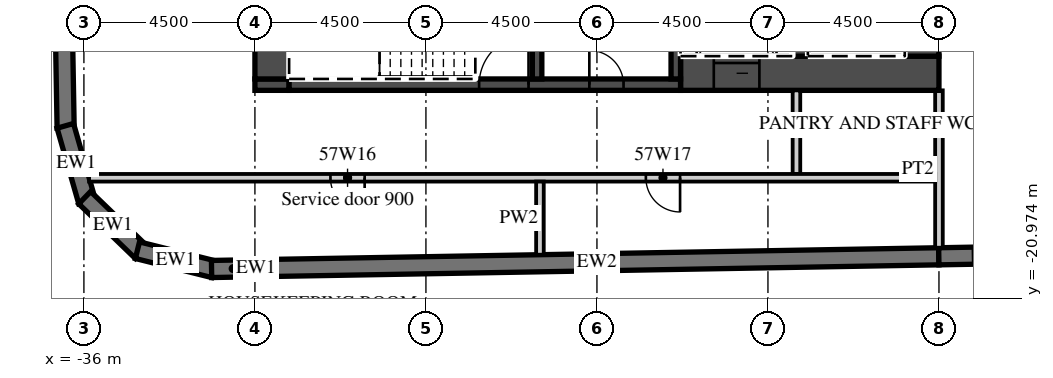
"""IFC4 building model, lengths in metres.
Left out: names, types, materials, properties, quantities, classifications, styles, units other than length and angle.
Written with IfcOpenShell. Run it as: python <this file> out.ifc"""

import sys

from ifc_helpers import new_model, si_unit, direction, frame, frame_2d, origin, place, context, subcontext, project, spatial, polyline, rectangle, outline, extrude, element, fill, save


model = new_model("IFC4")
c1 = context("Model", 3, precision=1e-05, world=origin(), true_north=direction((0.0, 1.0)))
c2 = subcontext(c1, "Body", "Model", "MODEL_VIEW")
j1 = project(units=[si_unit("LENGTHUNIT", "METRE"), si_unit("PLANEANGLEUNIT", "RADIAN")], contexts=[c1])
p1 = place(None, origin())
s1 = spatial("IfcSite", under=j1, at=p1, CompositionType="ELEMENT")
p2 = place(p1, origin())
s2 = spatial("IfcBuilding", under=s1, at=p2, CompositionType="ELEMENT")
p3 = place(p2, frame((0.0, 0.0, 234.2)))
s3 = spatial("IfcBuildingStorey", under=s2, at=p3, CompositionType="ELEMENT", Elevation=234.2)
p4 = place(p3, frame((-37.057, 16.503, 0.0), z_axis=(0.0, 0.0, 1.0), x_axis=(0.017452279857, -0.999847697366, 0.0)))
e1 = element("IfcWall", 1, at=p4, inside=s3, PredefinedType="SOLIDWALL", context=c2, shape_type="SweptSolid", body=[
    extrude(rectangle(XDim=33.0, YDim=0.45, at=frame_2d((16.5, 0.0))), origin(), (0.0, 0.0, 1.0), 3.02),
])
p5 = place(p3, frame((-36.49, -16.434, 0.0), z_axis=(0.0, 0.0, 1.0), x_axis=(0.275577603096, -0.961278827745, 0.0)))
e2 = element("IfcWall", 2, at=p5, inside=s3, PredefinedType="SOLIDWALL", context=c2, shape_type="SweptSolid", body=[
    extrude(outline(polyline([(0.0, -0.225), (2.071, -0.225), (1.95, 0.225), (0.121, 0.225), (0.0, -0.225)])), origin(), (0.0, 0.0, 1.0), 3.02),
])
p6 = place(p3, frame((-35.979, -18.324, 0.0), z_axis=(0.0, 0.0, 1.0), x_axis=(0.719320193998, -0.694678672846, 0.0)))
e3 = element("IfcWall", 3, at=p6, inside=s3, PredefinedType="SOLIDWALL", context=c2, shape_type="SweptSolid", body=[
    extrude(outline(polyline([(0.0, -0.225), (2.071, -0.225), (1.95, 0.225), (0.121, 0.225), (0.0, -0.225)])), origin(), (0.0, 0.0, 1.0), 3.02),
])
p7 = place(p3, frame((-34.591, -19.706, 0.0), z_axis=(0.0, 0.0, 1.0), x_axis=(0.970315655375, -0.241841950319, 0.0)))
e4 = element("IfcWall", 4, at=p7, inside=s3, PredefinedType="SOLIDWALL", context=c2, shape_type="SweptSolid", body=[
    extrude(outline(polyline([(0.0, -0.225), (2.071, -0.225), (1.95, 0.225), (0.121, 0.225), (0.0, -0.225)])), origin(), (0.0, 0.0, 1.0), 3.02),
])
p8 = place(p3, frame((-32.641, -20.2, 0.0), z_axis=(0.0, 0.0, 1.0), x_axis=(0.99984870815, 0.017394275206, 0.0)))
e5 = element("IfcWall", 5, at=p8, inside=s3, PredefinedType="SOLIDWALL", context=c2, shape_type="SweptSolid", body=[
    extrude(rectangle(XDim=1.137, YDim=0.45, at=frame_2d((0.568, 0.0))), origin(), (0.0, 0.0, 1.0), 3.02),
])
p9 = place(p3, frame((-31.504, -20.18, 0.0), z_axis=(0.0, 0.0, 1.0), x_axis=(0.999847677887, 0.017453395744, 0.0)))
e6 = element("IfcWall", 6, at=p9, inside=s3, PredefinedType="SOLIDWALL", context=c2, shape_type="SweptSolid", body=[
    extrude(rectangle(XDim=18.003, YDim=0.45, at=frame_2d((9.001, 0.0))), origin(), (0.0, 0.0, 1.0), 3.02),
])
p10 = place(p3, frame((-13.504, -19.866, 0.0), z_axis=(0.0, 0.0, 1.0), x_axis=(0.999847672978, 0.017453676992, 0.0)))
e7 = element("IfcWall", 7, at=p10, inside=s3, PredefinedType="SOLIDWALL", context=c2, shape_type="SweptSolid", body=[
    extrude(rectangle(XDim=52.86, YDim=0.45, at=frame_2d((26.43, 0.0))), origin(), (0.0, 0.0, 1.0), 3.02),
])
p11 = place(p10, frame((0.9, 0.0, 0.45)))
e8 = element("IfcOpeningElement", 8, at=p11, cuts=e7, PredefinedType="OPENING", context=c2, shape_type="SweptSolid", body=[
    extrude(rectangle(XDim=2.7, YDim=2.25, at=frame_2d((1.35, 1.125))), frame((0.0, 0.235, 0.0), z_axis=(0.0, -1.0, 0.0), x_axis=(1.0, 0.0, 0.0)), (0.0, 0.0, 1.0), 0.47),
])
p12 = place(p10, frame((5.401, 0.0, 0.45)))
e9 = element("IfcOpeningElement", 9, at=p12, cuts=e7, PredefinedType="OPENING", context=c2, shape_type="SweptSolid", body=[
    extrude(rectangle(XDim=2.7, YDim=2.25, at=frame_2d((1.35, 1.125))), frame((0.0, 0.235, 0.0), z_axis=(0.0, -1.0, 0.0), x_axis=(1.0, 0.0, 0.0)), (0.0, 0.0, 1.0), 0.47),
])
p13 = place(p10, frame((9.902, 0.0, 0.45)))
e10 = element("IfcOpeningElement", 10, at=p13, cuts=e7, PredefinedType="OPENING", context=c2, shape_type="SweptSolid", body=[
    extrude(rectangle(XDim=2.7, YDim=2.25, at=frame_2d((1.35, 1.125))), frame((0.0, 0.235, 0.0), z_axis=(0.0, -1.0, 0.0), x_axis=(1.0, 0.0, 0.0)), (0.0, 0.0, 1.0), 0.47),
])
p14 = place(p10, frame((14.402, 0.0, 0.45)))
e11 = element("IfcOpeningElement", 11, at=p14, cuts=e7, PredefinedType="OPENING", context=c2, shape_type="SweptSolid", body=[
    extrude(rectangle(XDim=2.7, YDim=2.25, at=frame_2d((1.35, 1.125))), frame((0.0, 0.235, 0.0), z_axis=(0.0, -1.0, 0.0), x_axis=(1.0, 0.0, 0.0)), (0.0, 0.0, 1.0), 0.47),
])
p15 = place(p10, frame((18.903, 0.0, 0.45)))
e12 = element("IfcOpeningElement", 12, at=p15, cuts=e7, PredefinedType="OPENING", context=c2, shape_type="SweptSolid", body=[
    extrude(rectangle(XDim=2.7, YDim=2.25, at=frame_2d((1.35, 1.125))), frame((0.0, 0.235, 0.0), z_axis=(0.0, -1.0, 0.0), x_axis=(1.0, 0.0, 0.0)), (0.0, 0.0, 1.0), 0.47),
])
p16 = place(p10, frame((23.404, 0.0, 0.45)))
e13 = element("IfcOpeningElement", 13, at=p16, cuts=e7, PredefinedType="OPENING", context=c2, shape_type="SweptSolid", body=[
    extrude(rectangle(XDim=2.7, YDim=2.25, at=frame_2d((1.35, 1.125))), frame((0.0, 0.235, 0.0), z_axis=(0.0, -1.0, 0.0), x_axis=(1.0, 0.0, 0.0)), (0.0, 0.0, 1.0), 0.47),
])
p17 = place(p10, frame((27.904, 0.0, 0.45)))
e14 = element("IfcOpeningElement", 14, at=p17, cuts=e7, PredefinedType="OPENING", context=c2, shape_type="SweptSolid", body=[
    extrude(rectangle(XDim=2.7, YDim=2.25, at=frame_2d((1.35, 1.125))), frame((0.0, 0.235, 0.0), z_axis=(0.0, -1.0, 0.0), x_axis=(1.0, 0.0, 0.0)), (0.0, 0.0, 1.0), 0.47),
])
p18 = place(p10, frame((32.405, 0.0, 0.45)))
e15 = element("IfcOpeningElement", 15, at=p18, cuts=e7, PredefinedType="OPENING", context=c2, shape_type="SweptSolid", body=[
    extrude(rectangle(XDim=2.7, YDim=2.25, at=frame_2d((1.35, 1.125))), frame((0.0, 0.235, 0.0), z_axis=(0.0, -1.0, 0.0), x_axis=(1.0, 0.0, 0.0)), (0.0, 0.0, 1.0), 0.47),
])
p19 = place(p10, frame((36.906, 0.0, 0.45)))
e16 = element("IfcOpeningElement", 16, at=p19, cuts=e7, PredefinedType="OPENING", context=c2, shape_type="SweptSolid", body=[
    extrude(rectangle(XDim=2.7, YDim=2.25, at=frame_2d((1.35, 1.125))), frame((0.0, 0.235, 0.0), z_axis=(0.0, -1.0, 0.0), x_axis=(1.0, 0.0, 0.0)), (0.0, 0.0, 1.0), 0.47),
])
p20 = place(p10, frame((41.406, 0.0, 0.45)))
e17 = element("IfcOpeningElement", 17, at=p20, cuts=e7, PredefinedType="OPENING", context=c2, shape_type="SweptSolid", body=[
    extrude(rectangle(XDim=2.7, YDim=2.25, at=frame_2d((1.35, 1.125))), frame((0.0, 0.235, 0.0), z_axis=(0.0, -1.0, 0.0), x_axis=(1.0, 0.0, 0.0)), (0.0, 0.0, 1.0), 0.47),
])
p21 = place(p10, frame((45.907, 0.0, 0.45)))
e18 = element("IfcOpeningElement", 18, at=p21, cuts=e7, PredefinedType="OPENING", context=c2, shape_type="SweptSolid", body=[
    extrude(rectangle(XDim=2.7, YDim=2.25, at=frame_2d((1.35, 1.125))), frame((0.0, 0.235, 0.0), z_axis=(0.0, -1.0, 0.0), x_axis=(1.0, 0.0, 0.0)), (0.0, 0.0, 1.0), 0.47),
])
p22 = place(p3, frame((-13.5, -19.641, 0.0), z_axis=(0.0, 0.0, 1.0), x_axis=(0.0, 1.0, 0.0)))
e19 = element("IfcWall", 19, at=p22, inside=s3, PredefinedType="PARTITIONING", context=c2, shape_type="SweptSolid", body=[
    extrude(rectangle(XDim=4.141, YDim=0.2, at=frame_2d((2.071, 0.0))), origin(), (0.0, 0.0, 1.0), 3.02),
])
p23 = place(p3, frame((-20.3, -15.05, 0.0), z_axis=(0.0, 0.0, 1.0), x_axis=(1.0, 0.0, 0.0)))
e20 = element("IfcWall", 20, at=p23, inside=s3, PredefinedType="SHEAR", context=c2, shape_type="SweptSolid", body=[
    extrude(rectangle(XDim=6.8, YDim=0.9, at=frame_2d((3.4, 0.0))), origin(), (0.0, 0.0, 1.0), 3.02),
])
p24 = place(p23, frame((0.875, 0.0, 0.0)))
e21 = element("IfcOpeningElement", 21, at=p24, cuts=e20, PredefinedType="OPENING", context=c2, shape_type="SweptSolid", body=[
    extrude(rectangle(XDim=1.2, YDim=2.1, at=frame_2d((0.6, 1.05))), frame((0.0, 0.46, 0.0), z_axis=(0.0, -1.0, 0.0), x_axis=(1.0, 0.0, 0.0)), (0.0, 0.0, 1.0), 0.92),
])
p25 = place(p3, frame((-31.5, -15.35, 0.0), z_axis=(0.0, 0.0, 1.0), x_axis=(1.0, 0.0, 0.0)))
e22 = element("IfcWall", 22, at=p25, inside=s3, PredefinedType="SHEAR", context=c2, shape_type="SweptSolid", body=[
    extrude(rectangle(XDim=0.9, YDim=0.3, at=frame_2d((0.45, 0.0))), origin(), (0.0, 0.0, 1.0), 3.02),
])
p26 = place(p3, frame((-30.6, -15.35, 0.0), z_axis=(0.0, 0.0, 1.0), x_axis=(1.0, 0.0, 0.0)))
e23 = element("IfcWall", 23, at=p26, inside=s3, PredefinedType="SHEAR", context=c2, shape_type="SweptSolid", body=[
    extrude(rectangle(XDim=10.3, YDim=0.3, at=frame_2d((5.15, 0.0))), origin(), (0.0, 0.0, 1.0), 3.02),
])
p27 = place(p26, frame((5.0, 0.0, 0.0)))
e24 = element("IfcOpeningElement", 24, at=p27, cuts=e23, PredefinedType="OPENING", context=c2, shape_type="SweptSolid", body=[
    extrude(rectangle(XDim=1.3, YDim=2.1, at=frame_2d((0.65, 1.05))), frame((0.0, 0.16, 0.0), z_axis=(0.0, -1.0, 0.0), x_axis=(1.0, 0.0, 0.0)), (0.0, 0.0, 1.0), 0.32),
])
p28 = place(p26, frame((7.9, 0.0, 0.0)))
e25 = element("IfcOpeningElement", 25, at=p28, cuts=e23, PredefinedType="OPENING", context=c2, shape_type="SweptSolid", body=[
    extrude(rectangle(XDim=0.9, YDim=2.1, at=frame_2d((0.45, 1.05))), frame((0.0, 0.16, 0.0), z_axis=(0.0, -1.0, 0.0), x_axis=(1.0, 0.0, 0.0)), (0.0, 0.0, 1.0), 0.32),
])
p29 = place(p3, frame((-31.05, -15.2, 0.0), z_axis=(0.0, 0.0, 1.0), x_axis=(0.0, 1.0, 0.0)))
e26 = element("IfcWall", 26, at=p29, inside=s3, PredefinedType="SHEAR", context=c2, shape_type="SweptSolid", body=[
    extrude(rectangle(XDim=12.8, YDim=0.9, at=frame_2d((6.4, 0.0))), origin(), (0.0, 0.0, 1.0), 3.02),
])
p30 = place(p29, frame((11.5, 0.0, 0.0)))
e27 = element("IfcOpeningElement", 27, at=p30, cuts=e26, PredefinedType="OPENING", context=c2, shape_type="SweptSolid", body=[
    extrude(rectangle(XDim=1.1, YDim=2.1, at=frame_2d((0.55, 1.05))), frame((0.0, 0.46, 0.0), z_axis=(0.0, -1.0, 0.0), x_axis=(1.0, 0.0, 0.0)), (0.0, 0.0, 1.0), 0.92),
])
p31 = place(p3, frame((-13.95, -14.6, 0.0), z_axis=(0.0, 0.0, 1.0), x_axis=(0.0, 1.0, 0.0)))
e28 = element("IfcWall", 28, at=p31, inside=s3, PredefinedType="SHEAR", context=c2, shape_type="SweptSolid", body=[
    extrude(rectangle(XDim=12.2, YDim=0.9, at=frame_2d((6.1, 0.0))), origin(), (0.0, 0.0, 1.0), 3.02),
])
p32 = place(p3, frame((-17.15, -14.6, 0.0), z_axis=(0.0, 0.0, 1.0), x_axis=(0.0, 1.0, 0.0)))
e29 = element("IfcWall", 29, at=p32, inside=s3, PredefinedType="SHEAR", context=c2, shape_type="SweptSolid", body=[
    extrude(rectangle(XDim=5.8, YDim=0.4, at=frame_2d((2.9, 0.0))), origin(), (0.0, 0.0, 1.0), 3.02),
])
for number, where, z_axis, x_axis in (
    (30, (-20.425, -15.2, 0.0), (0.0, 0.0, 1.0), (0.0, 1.0, 0.0)),
    (31, (-24.075, -15.2, 0.0), (0.0, 0.0, 1.0), (0.0, 1.0, 0.0)),
):
    element("IfcWall", number, at=place(p3, frame(where, z_axis=z_axis, x_axis=x_axis)), inside=s3, PredefinedType="SHEAR", context=c2, shape_type="SweptSolid", body=[
        extrude(rectangle(XDim=3.25, YDim=0.25, at=frame_2d((1.625, 0.0))), origin(), (0.0, 0.0, 1.0), 3.02),
    ])
p33 = place(p3, frame((-17.25, -17.7, 0.0), z_axis=(0.0, 0.0, 1.0), x_axis=(0.0, 1.0, 0.0)))
e32 = element("IfcWall", 32, at=p33, inside=s3, PredefinedType="PARTITIONING", context=c2, shape_type="SweptSolid", body=[
    extrude(rectangle(XDim=2.2, YDim=0.2, at=frame_2d((1.1, 0.0))), origin(), (0.0, 0.0, 1.0), 3.02),
])
p34 = place(p3, frame((-35.864, -17.8, 0.0), z_axis=(0.0, 0.0, 1.0), x_axis=(1.0, 0.0, 0.0)))
e33 = element("IfcWall", 33, at=p34, inside=s3, PredefinedType="PARTITIONING", context=c2, shape_type="SweptSolid", body=[
    extrude(rectangle(XDim=22.264, YDim=0.2, at=frame_2d((11.132, 0.0))), origin(), (0.0, 0.0, 1.0), 3.02),
])
p35 = place(p34, frame((6.351, 0.0, 0.0)))
e34 = element("IfcOpeningElement", 34, at=p35, cuts=e33, PredefinedType="OPENING", context=c2, shape_type="SweptSolid", body=[
    extrude(rectangle(XDim=0.9, YDim=2.1, at=frame_2d((0.45, 1.05))), frame((0.0, 0.11, 0.0), z_axis=(0.0, -1.0, 0.0), x_axis=(1.0, 0.0, 0.0)), (0.0, 0.0, 1.0), 0.22),
])
p36 = place(p34, frame((14.651, 0.0, 0.0)))
e35 = element("IfcOpeningElement", 35, at=p36, cuts=e33, PredefinedType="OPENING", context=c2, shape_type="SweptSolid", body=[
    extrude(rectangle(XDim=0.9, YDim=2.1, at=frame_2d((0.45, 1.05))), frame((0.0, 0.11, 0.0), z_axis=(0.0, -1.0, 0.0), x_axis=(1.0, 0.0, 0.0)), (0.0, 0.0, 1.0), 0.22),
])
p37 = place(p3, frame((-24.0, -19.824, 0.0), z_axis=(0.0, 0.0, 1.0), x_axis=(0.0, 1.0, 0.0)))
e36 = element("IfcWall", 36, at=p37, inside=s3, PredefinedType="PARTITIONING", context=c2, shape_type="SweptSolid", body=[
    extrude(rectangle(XDim=1.925, YDim=0.2, at=frame_2d((0.962, 0.0))), origin(), (0.0, 0.0, 1.0), 3.02),
])
p38 = place(p11, origin())
e37 = element("IfcWindow", 37, at=p38, inside=s3, PartitioningType="SINGLE_PANEL", PredefinedType="WINDOW", context=c2, shape_type="SweptSolid", body=[
    extrude(rectangle(XDim=2.7, YDim=2.25, at=frame_2d((1.35, 1.125))), frame((0.0, 0.09, 0.0), z_axis=(0.0, -1.0, 0.0), x_axis=(1.0, 0.0, 0.0)), (0.0, 0.0, 1.0), 0.06),
])
fill(e8, e37)
p39 = place(p24, origin())
e38 = element("IfcDoor", 38, at=p39, inside=s3, OperationType="SLIDING_TO_LEFT", PredefinedType="DOOR", context=c2, shape_type="SweptSolid", body=[
    extrude(rectangle(XDim=1.2, YDim=2.1, at=frame_2d((0.6, 1.05))), frame((0.0, 0.025, 0.0), z_axis=(0.0, -1.0, 0.0), x_axis=(1.0, 0.0, 0.0)), (0.0, 0.0, 1.0), 0.05),
])
fill(e21, e38)
p40 = place(p27, origin())
e39 = element("IfcDoor", 39, at=p40, inside=s3, OperationType="SINGLE_SWING_RIGHT", PredefinedType="DOOR", context=c2, shape_type="SweptSolid", body=[
    extrude(rectangle(XDim=1.3, YDim=2.1, at=frame_2d((0.65, 1.05))), frame((0.0, 0.025, 0.0), z_axis=(0.0, -1.0, 0.0), x_axis=(1.0, 0.0, 0.0)), (0.0, 0.0, 1.0), 0.05),
])
fill(e24, e39)
p41 = place(p28, origin())
e40 = element("IfcDoor", 40, at=p41, inside=s3, OperationType="SINGLE_SWING_LEFT", PredefinedType="DOOR", context=c2, shape_type="SweptSolid", body=[
    extrude(rectangle(XDim=0.9, YDim=2.1, at=frame_2d((0.45, 1.05))), frame((0.0, 0.025, 0.0), z_axis=(0.0, -1.0, 0.0), x_axis=(1.0, 0.0, 0.0)), (0.0, 0.0, 1.0), 0.05),
])
fill(e25, e40)
p42 = place(p35, origin())
e41 = element("IfcDoor", 41, at=p42, inside=s3, OperationType="SINGLE_SWING_RIGHT", PredefinedType="DOOR", context=c2, shape_type="SweptSolid", body=[
    extrude(rectangle(XDim=0.9, YDim=2.1, at=frame_2d((0.45, 1.05))), frame((0.0, 0.025, 0.0), z_axis=(0.0, -1.0, 0.0), x_axis=(1.0, 0.0, 0.0)), (0.0, 0.0, 1.0), 0.05),
])
fill(e34, e41)
p43 = place(p36, origin())
e42 = element("IfcDoor", 42, at=p43, inside=s3, OperationType="SINGLE_SWING_RIGHT", PredefinedType="DOOR", context=c2, shape_type="SweptSolid", body=[
    extrude(rectangle(XDim=0.9, YDim=2.1, at=frame_2d((0.45, 1.05))), frame((0.0, 0.025, 0.0), z_axis=(0.0, -1.0, 0.0), x_axis=(1.0, 0.0, 0.0)), (0.0, 0.0, 1.0), 0.05),
])
fill(e35, e42)
save(model, sys.argv[1])
